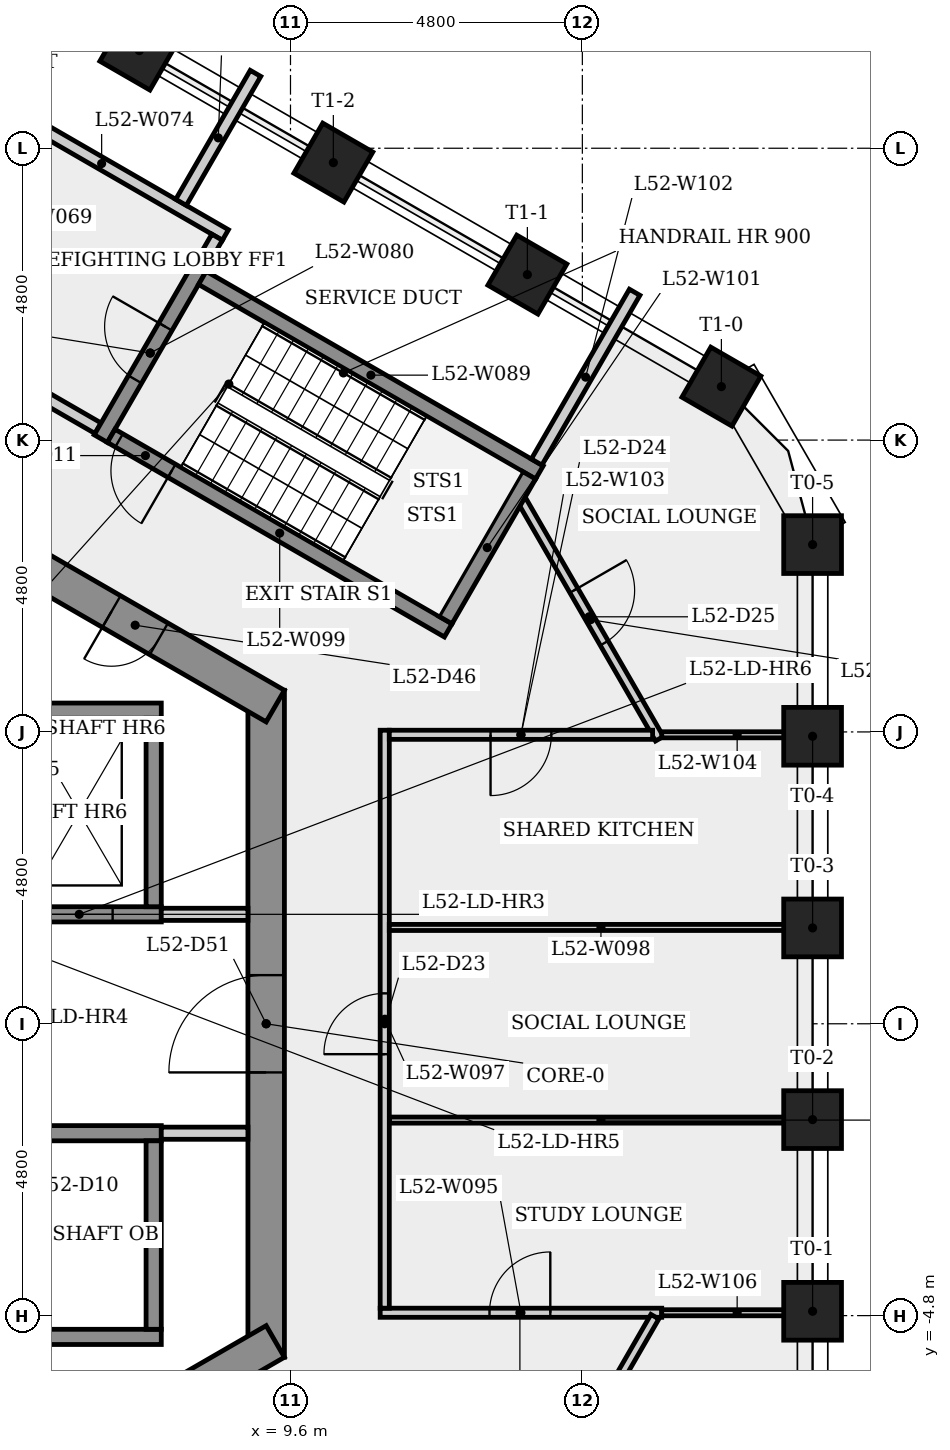
"""IFC4 building model, lengths in metres.
Left out: names, types, materials, properties, quantities, classifications, styles, units other than length and angle.
Written with IfcOpenShell. Run it as: python <this file> out.ifc"""

import sys

from ifc_helpers import new_model, si_unit, direction, frame, frame_2d, origin, origin_2d, place, context, subcontext, project, spatial, rectangle, extrude, element, fill, save


model = new_model("IFC4")
c1 = context("Model", 3, precision=1e-05, world=origin(), true_north=direction((0.0, 1.0)))
c2 = subcontext(c1, "Body", "Model", "MODEL_VIEW")
j1 = project(units=[si_unit("LENGTHUNIT", "METRE"), si_unit("PLANEANGLEUNIT", "RADIAN")], contexts=[c1])
p1 = place(None, origin())
s1 = spatial("IfcSite", under=j1, at=p1, CompositionType="ELEMENT")
p2 = place(p1, origin())
s2 = spatial("IfcBuilding", under=s1, at=p2, CompositionType="ELEMENT")
p3 = place(p2, frame((0.0, 0.0, 194.7)))
s3 = spatial("IfcBuildingStorey", under=s2, at=p3, CompositionType="ELEMENT", Elevation=194.7)
p4 = place(p3, frame((9.2, -5.485, 0.0), z_axis=(0.0, 0.0, 1.0), x_axis=(0.0, 1.0, 0.0)))
e1 = element("IfcWall", 1, at=p4, inside=s3, PredefinedType="SHEAR", context=c2, shape_type="SweptSolid", body=[
    extrude(rectangle(XDim=10.97, YDim=0.6, at=frame_2d((5.485, 0.0))), origin(), (0.0, 0.0, 1.0), 4.0),
])
p5 = place(p4, frame((4.685, 0.0, 0.0)))
e2 = element("IfcOpeningElement", 2, at=p5, cuts=e1, PredefinedType="OPENING", context=c2, shape_type="SweptSolid", body=[
    extrude(rectangle(XDim=1.6, YDim=2.1, at=frame_2d((0.8, 1.05))), frame((0.0, 0.31, 0.0), z_axis=(0.0, -1.0, 0.0), x_axis=(1.0, 0.0, 0.0)), (0.0, 0.0, 1.0), 0.62),
])
p6 = place(p3, frame((9.35, 5.225, 0.0), z_axis=(0.0, 0.0, 1.0), x_axis=(-0.866023993627, 0.500002442456, 0.0)))
e3 = element("IfcWall", 3, at=p6, inside=s3, PredefinedType="SHEAR", context=c2, shape_type="SweptSolid", body=[
    extrude(rectangle(XDim=10.97, YDim=0.6, at=frame_2d((5.485, 0.0))), origin(), (0.0, 0.0, 1.0), 4.0),
])
p7 = place(p6, frame((9.018, 0.0, 0.0)))
e4 = element("IfcOpeningElement", 4, at=p7, cuts=e3, PredefinedType="OPENING", context=c2, shape_type="SweptSolid", body=[
    extrude(rectangle(XDim=0.9, YDim=2.1, at=frame_2d((0.45, 1.05))), frame((0.0, 0.31, 0.0), z_axis=(0.0, -1.0, 0.0), x_axis=(1.0, 0.0, 0.0)), (0.0, 0.0, 1.0), 0.62),
])
p8 = place(p6, frame((2.211, 0.0, 0.0)))
e5 = element("IfcOpeningElement", 5, at=p8, cuts=e3, PredefinedType="OPENING", context=c2, shape_type="SweptSolid", body=[
    extrude(rectangle(XDim=0.9, YDim=2.1, at=frame_2d((0.45, 1.05))), frame((0.0, 0.31, 0.0), z_axis=(0.0, -1.0, 0.0), x_axis=(1.0, 0.0, 0.0)), (0.0, 0.0, 1.0), 0.62),
])
p9 = place(p3, frame((-0.15, -10.71, 0.0), z_axis=(0.0, 0.0, 1.0), x_axis=(0.866023993627, 0.500002442456, 0.0)))
e6 = element("IfcWall", 6, at=p9, inside=s3, PredefinedType="SHEAR", context=c2, shape_type="SweptSolid", body=[
    extrude(rectangle(XDim=10.97, YDim=0.6, at=frame_2d((5.485, 0.0))), origin(), (0.0, 0.0, 1.0), 4.0),
])
p10 = place(p9, frame((7.166, 0.0, 0.0)))
e7 = element("IfcOpeningElement", 7, at=p10, cuts=e6, PredefinedType="OPENING", context=c2, shape_type="SweptSolid", body=[
    extrude(rectangle(XDim=0.9, YDim=2.1, at=frame_2d((0.45, 1.05))), frame((0.0, 0.31, 0.0), z_axis=(0.0, -1.0, 0.0), x_axis=(1.0, 0.0, 0.0)), (0.0, 0.0, 1.0), 0.62),
])
for number, where, z_axis, x_axis in (
    (8, (18.187, -4.729, 0.0), (0.0, 0.0, 1.0), (1.0, 0.0, 0.0)),
    (9, (18.187, -1.576, 0.0), (0.0, 0.0, 1.0), (1.0, 0.0, 0.0)),
    (10, (18.187, 1.576, 0.0), (0.0, 0.0, 1.0), (1.0, 0.0, 0.0)),
    (11, (18.187, 4.729, 0.0), (0.0, 0.0, 1.0), (1.0, 0.0, 0.0)),
    (12, (18.187, 7.881, 0.0), (0.0, 0.0, 1.0), (1.0, 0.0, 0.0)),
    (13, (16.687, 10.479, 0.0), (0.0, 0.0, 1.0), (0.5, 0.866, 0.0)),
    (14, (13.496, 12.322, 0.0), (0.0, 0.0, 1.0), (0.5, 0.866, 0.0)),
    (15, (10.305, 14.164, 0.0), (0.0, 0.0, 1.0), (0.5, 0.866, 0.0)),
    (16, (7.114, 16.006, 0.0), (0.0, 0.0, 1.0), (0.5, 0.866, 0.0)),
):
    element("IfcColumn", number, at=place(p3, frame(where, z_axis=z_axis, x_axis=x_axis)), inside=s3, PredefinedType="COLUMN", context=c2, shape_type="SweptSolid", body=[
        extrude(rectangle(XDim=0.95, YDim=0.95, at=origin_2d()), origin(), (0.0, 0.0, 1.0), 4.0),
    ])
p11 = place(p3, frame((-7.475, 1.8, 0.0), z_axis=(0.0, 0.0, 1.0), x_axis=(1.0, 0.0, 0.0)))
e17 = element("IfcWall", 17, at=p11, inside=s3, PredefinedType="SHEAR", context=c2, shape_type="SweptSolid", body=[
    extrude(rectangle(XDim=14.95, YDim=0.25, at=frame_2d((7.475, 0.0))), origin(), (0.0, 0.0, 1.0), 3.65),
])
p12 = place(p11, frame((0.8, 0.0, 0.0)))
e18 = element("IfcOpeningElement", 18, at=p12, cuts=e17, PredefinedType="OPENING", context=c2, shape_type="SweptSolid", body=[
    extrude(rectangle(XDim=1.1, YDim=2.1, at=frame_2d((0.55, 1.05))), frame((0.0, 0.135, 0.0), z_axis=(0.0, -1.0, 0.0), x_axis=(1.0, 0.0, 0.0)), (0.0, 0.0, 1.0), 0.27),
])
p13 = place(p11, frame((3.25, 0.0, 0.0)))
e19 = element("IfcOpeningElement", 19, at=p13, cuts=e17, PredefinedType="OPENING", context=c2, shape_type="SweptSolid", body=[
    extrude(rectangle(XDim=1.1, YDim=2.1, at=frame_2d((0.55, 1.05))), frame((0.0, 0.135, 0.0), z_axis=(0.0, -1.0, 0.0), x_axis=(1.0, 0.0, 0.0)), (0.0, 0.0, 1.0), 0.27),
])
p14 = place(p11, frame((5.7, 0.0, 0.0)))
e20 = element("IfcOpeningElement", 20, at=p14, cuts=e17, PredefinedType="OPENING", context=c2, shape_type="SweptSolid", body=[
    extrude(rectangle(XDim=1.1, YDim=2.1, at=frame_2d((0.55, 1.05))), frame((0.0, 0.135, 0.0), z_axis=(0.0, -1.0, 0.0), x_axis=(1.0, 0.0, 0.0)), (0.0, 0.0, 1.0), 0.27),
])
p15 = place(p11, frame((8.15, 0.0, 0.0)))
e21 = element("IfcOpeningElement", 21, at=p15, cuts=e17, PredefinedType="OPENING", context=c2, shape_type="SweptSolid", body=[
    extrude(rectangle(XDim=1.1, YDim=2.1, at=frame_2d((0.55, 1.05))), frame((0.0, 0.135, 0.0), z_axis=(0.0, -1.0, 0.0), x_axis=(1.0, 0.0, 0.0)), (0.0, 0.0, 1.0), 0.27),
])
p16 = place(p11, frame((10.6, 0.0, 0.0)))
e22 = element("IfcOpeningElement", 22, at=p16, cuts=e17, PredefinedType="OPENING", context=c2, shape_type="SweptSolid", body=[
    extrude(rectangle(XDim=1.1, YDim=2.1, at=frame_2d((0.55, 1.05))), frame((0.0, 0.135, 0.0), z_axis=(0.0, -1.0, 0.0), x_axis=(1.0, 0.0, 0.0)), (0.0, 0.0, 1.0), 0.27),
])
p17 = place(p11, frame((13.05, 0.0, 0.0)))
e23 = element("IfcOpeningElement", 23, at=p17, cuts=e17, PredefinedType="OPENING", context=c2, shape_type="SweptSolid", body=[
    extrude(rectangle(XDim=1.1, YDim=2.1, at=frame_2d((0.55, 1.05))), frame((0.0, 0.135, 0.0), z_axis=(0.0, -1.0, 0.0), x_axis=(1.0, 0.0, 0.0)), (0.0, 0.0, 1.0), 0.27),
])
p18 = place(p3, frame((-7.225, 5.15, 0.0), z_axis=(0.0, 0.0, 1.0), x_axis=(1.0, 0.0, 0.0)))
e24 = element("IfcWall", 24, at=p18, inside=s3, PredefinedType="SHEAR", context=c2, shape_type="SweptSolid", body=[
    extrude(rectangle(XDim=14.7, YDim=0.25, at=frame_2d((7.35, 0.0))), origin(), (0.0, 0.0, 1.0), 3.65),
])
p19 = place(p3, frame((4.459, 15.323, 0.0), z_axis=(0.0, 0.0, 1.0), x_axis=(0.866016039709, -0.500016218704, 0.0)))
e25 = element("IfcWall", 25, at=p19, inside=s3, PredefinedType="PLUMBINGWALL", context=c2, shape_type="SweptSolid", body=[
    extrude(rectangle(XDim=4.7, YDim=0.2, at=frame_2d((2.35, 0.0))), origin(), (0.0, 0.0, 1.0), 3.65),
])
p20 = place(p3, frame((2.575, -5.15, 0.0), z_axis=(0.0, 0.0, 1.0), x_axis=(1.0, 0.0, 0.0)))
e26 = element("IfcWall", 26, at=p20, inside=s3, PredefinedType="SHEAR", context=c2, shape_type="SweptSolid", body=[
    extrude(rectangle(XDim=4.9, YDim=0.25, at=frame_2d((2.45, 0.0))), origin(), (0.0, 0.0, 1.0), 3.65),
])
p21 = place(p3, frame((2.575, -1.8, 0.0), z_axis=(0.0, 0.0, 1.0), x_axis=(1.0, 0.0, 0.0)))
e27 = element("IfcWall", 27, at=p21, inside=s3, PredefinedType="SHEAR", context=c2, shape_type="SweptSolid", body=[
    extrude(rectangle(XDim=4.9, YDim=0.25, at=frame_2d((2.45, 0.0))), origin(), (0.0, 0.0, 1.0), 3.65),
])
p22 = place(p21, frame((0.597, 0.0, 0.0)))
e28 = element("IfcOpeningElement", 28, at=p22, cuts=e27, PredefinedType="OPENING", context=c2, shape_type="SweptSolid", body=[
    extrude(rectangle(XDim=1.1, YDim=2.1, at=frame_2d((0.55, 1.05))), frame((0.0, 0.135, 0.0), z_axis=(0.0, -1.0, 0.0), x_axis=(1.0, 0.0, 0.0)), (0.0, 0.0, 1.0), 0.27),
])
p23 = place(p3, frame((6.435, 9.795, 0.0), z_axis=(0.0, 0.0, 1.0), x_axis=(-0.866012907634, 0.500021643343, 0.0)))
e29 = element("IfcWall", 29, at=p23, inside=s3, PredefinedType="PARTITIONING", context=c2, shape_type="SweptSolid", body=[
    extrude(rectangle(XDim=4.45, YDim=0.2, at=frame_2d((2.225, 0.0))), origin(), (0.0, 0.0, 1.0), 3.65),
])
p24 = place(p23, frame((1.675, 0.0, 0.0)))
e30 = element("IfcOpeningElement", 30, at=p24, cuts=e29, PredefinedType="OPENING", context=c2, shape_type="SweptSolid", body=[
    extrude(rectangle(XDim=1.1, YDim=2.1, at=frame_2d((0.55, 1.05))), frame((0.0, 0.11, 0.0), z_axis=(0.0, -1.0, 0.0), x_axis=(1.0, 0.0, 0.0)), (0.0, 0.0, 1.0), 0.22),
])
p25 = place(p3, frame((6.48, 9.624, 0.0), z_axis=(0.0, 0.0, 1.0), x_axis=(0.500017246033, 0.866015446554, 0.0)))
e31 = element("IfcWall", 31, at=p25, inside=s3, PredefinedType="SHEAR", context=c2, shape_type="SweptSolid", body=[
    extrude(rectangle(XDim=3.25, YDim=0.25, at=frame_2d((1.625, 0.0))), origin(), (0.0, 0.0, 1.0), 3.65),
])
p26 = place(p25, frame((1.125, 0.0, 0.0)))
e32 = element("IfcOpeningElement", 32, at=p26, cuts=e31, PredefinedType="OPENING", context=c2, shape_type="SweptSolid", body=[
    extrude(rectangle(XDim=1.0, YDim=2.1, at=frame_2d((0.5, 1.05))), frame((0.0, 0.135, 0.0), z_axis=(0.0, -1.0, 0.0), x_axis=(1.0, 0.0, 0.0)), (0.0, 0.0, 1.0), 0.27),
])
p27 = place(p3, frame((7.475, 1.8, 0.0), z_axis=(0.0, 0.0, 1.0), x_axis=(1.0, 0.0, 0.0)))
e33 = element("IfcWall", 33, at=p27, inside=s3, PredefinedType="PARTITIONING", context=c2, shape_type="SweptSolid", body=[
    extrude(rectangle(XDim=1.425, YDim=0.2, at=frame_2d((0.712, 0.0))), origin(), (0.0, 0.0, 1.0), 3.65),
])
for number, where, z_axis, x_axis in (
    (34, (7.35, -1.925, 0.0), (0.0, 0.0, 1.0), (0.0, -1.0, 0.0)),
    (35, (7.35, 5.025, 0.0), (0.0, 0.0, 1.0), (0.0, -1.0, 0.0)),
):
    element("IfcWall", number, at=place(p3, frame(where, z_axis=z_axis, x_axis=x_axis)), inside=s3, PredefinedType="SHEAR", context=c2, shape_type="SweptSolid", body=[
        extrude(rectangle(XDim=3.1, YDim=0.25, at=frame_2d((1.55, 0.0))), origin(), (0.0, 0.0, 1.0), 4.0),
    ])
p28 = place(p3, frame((7.8, 13.51, 0.0), z_axis=(0.0, 0.0, 1.0), x_axis=(0.499955409341, 0.866051146683, 0.0)))
e36 = element("IfcWall", 36, at=p28, inside=s3, PredefinedType="PLUMBINGWALL", context=c2, shape_type="SweptSolid", body=[
    extrude(rectangle(XDim=2.449, YDim=0.2, at=frame_2d((1.225, 0.0))), origin(), (0.0, 0.0, 1.0), 3.65),
])
p29 = place(p3, frame((8.151, 12.268, 0.0), z_axis=(0.0, 0.0, 1.0), x_axis=(0.866025499775, -0.499999833739, 0.0)))
e37 = element("IfcWall", 37, at=p29, inside=s3, PredefinedType="SHEAR", context=c2, shape_type="SweptSolid", body=[
    extrude(rectangle(XDim=6.4, YDim=0.25, at=frame_2d((3.2, 0.0))), origin(), (0.0, 0.0, 1.0), 3.65),
])
p30 = place(p3, frame((8.393, 12.937, 0.0), z_axis=(0.0, 0.0, 1.0), x_axis=(-0.500065409566, -0.86598763626, 0.0)))
e38 = element("IfcWall", 38, at=p30, inside=s3, PredefinedType="PLUMBINGWALL", context=c2, shape_type="SweptSolid", body=[
    extrude(rectangle(XDim=0.575, YDim=0.2, at=frame_2d((0.288, 0.0))), origin(), (0.0, 0.0, 1.0), 3.65),
])
p31 = place(p3, frame((8.9, -1.8, 0.0), z_axis=(0.0, 0.0, 1.0), x_axis=(-1.0, 0.0, 0.0)))
e39 = element("IfcWall", 39, at=p31, inside=s3, PredefinedType="PARTITIONING", context=c2, shape_type="SweptSolid", body=[
    extrude(rectangle(XDim=1.425, YDim=0.2, at=frame_2d((0.712, 0.0))), origin(), (0.0, 0.0, 1.0), 3.65),
])
p32 = place(p3, frame((11.075, -4.753, 0.0), z_axis=(0.0, 0.0, 1.0), x_axis=(1.0, 0.0, 0.0)))
e40 = element("IfcWall", 40, at=p32, inside=s3, PredefinedType="PARTITIONING", context=c2, shape_type="SweptSolid", body=[
    extrude(rectangle(XDim=4.63, YDim=0.15, at=frame_2d((2.315, 0.0))), origin(), (0.0, 0.0, 1.0), 3.65),
])
p33 = place(p32, frame((1.798, 0.0, 0.0)))
e41 = element("IfcOpeningElement", 41, at=p33, cuts=e40, PredefinedType="OPENING", context=c2, shape_type="SweptSolid", body=[
    extrude(rectangle(XDim=1.0, YDim=2.1, at=frame_2d((0.5, 1.05))), frame((0.0, 0.085, 0.0), z_axis=(0.0, -1.0, 0.0), x_axis=(1.0, 0.0, 0.0)), (0.0, 0.0, 1.0), 0.17),
])
p34 = place(p3, frame((11.225, -1.584, 0.0), z_axis=(0.0, 0.0, 1.0), x_axis=(1.0, 0.0, 0.0)))
e42 = element("IfcWall", 42, at=p34, inside=s3, PredefinedType="PARTITIONING", context=c2, shape_type="SweptSolid", body=[
    extrude(rectangle(XDim=6.961, YDim=0.1, at=frame_2d((3.481, 0.0))), origin(), (0.0, 0.0, 1.0), 3.65),
])
p35 = place(p3, frame((11.15, -4.678, 0.0), z_axis=(0.0, 0.0, 1.0), x_axis=(0.0, 1.0, 0.0)))
e43 = element("IfcWall", 43, at=p35, inside=s3, PredefinedType="PARTITIONING", context=c2, shape_type="SweptSolid", body=[
    extrude(rectangle(XDim=9.506, YDim=0.15, at=frame_2d((4.753, 0.0))), origin(), (0.0, 0.0, 1.0), 3.65),
])
p36 = place(p35, frame((4.178, 0.0, 0.0)))
e44 = element("IfcOpeningElement", 44, at=p36, cuts=e43, PredefinedType="OPENING", context=c2, shape_type="SweptSolid", body=[
    extrude(rectangle(XDim=1.0, YDim=2.1, at=frame_2d((0.5, 1.05))), frame((0.0, 0.085, 0.0), z_axis=(0.0, -1.0, 0.0), x_axis=(1.0, 0.0, 0.0)), (0.0, 0.0, 1.0), 0.17),
])
p37 = place(p3, frame((11.225, 1.584, 0.0), z_axis=(0.0, 0.0, 1.0), x_axis=(1.0, 0.0, 0.0)))
e45 = element("IfcWall", 45, at=p37, inside=s3, PredefinedType="PARTITIONING", context=c2, shape_type="SweptSolid", body=[
    extrude(rectangle(XDim=6.961, YDim=0.1, at=frame_2d((3.481, 0.0))), origin(), (0.0, 0.0, 1.0), 3.65),
])
p38 = place(p3, frame((12.194, 6.47, 0.0), z_axis=(0.0, 0.0, 1.0), x_axis=(-0.866025499775, 0.499999833739, 0.0)))
e46 = element("IfcWall", 46, at=p38, inside=s3, PredefinedType="SHEAR", context=c2, shape_type="SweptSolid", body=[
    extrude(rectangle(XDim=6.4, YDim=0.25, at=frame_2d((3.2, 0.0))), origin(), (0.0, 0.0, 1.0), 3.65),
])
p39 = place(p38, frame((5.25, 0.0, 0.0)))
e47 = element("IfcOpeningElement", 47, at=p39, cuts=e46, PredefinedType="OPENING", context=c2, shape_type="SweptSolid", body=[
    extrude(rectangle(XDim=1.0, YDim=2.1, at=frame_2d((0.5, 1.05))), frame((0.0, 0.135, 0.0), z_axis=(0.0, -1.0, 0.0), x_axis=(1.0, 0.0, 0.0)), (0.0, 0.0, 1.0), 0.27),
])
p40 = place(p3, frame((13.406, 8.604, 0.0), z_axis=(0.0, 0.0, 1.0), x_axis=(0.500005951055, -0.866021967914, 0.0)))
e48 = element("IfcWall", 48, at=p40, inside=s3, PredefinedType="PARTITIONING", context=c2, shape_type="SweptSolid", body=[
    extrude(rectangle(XDim=4.522, YDim=0.15, at=frame_2d((2.261, 0.0))), origin(), (0.0, 0.0, 1.0), 3.65),
])
p41 = place(p40, frame((1.706, 0.0, 0.0)))
e49 = element("IfcOpeningElement", 49, at=p41, cuts=e48, PredefinedType="OPENING", context=c2, shape_type="SweptSolid", body=[
    extrude(rectangle(XDim=1.0, YDim=2.1, at=frame_2d((0.5, 1.05))), frame((0.0, 0.085, 0.0), z_axis=(0.0, -1.0, 0.0), x_axis=(1.0, 0.0, 0.0)), (0.0, 0.0, 1.0), 0.17),
])
p42 = place(p3, frame((12.148, 6.641, 0.0), z_axis=(0.0, 0.0, 1.0), x_axis=(0.500034990121, 0.866005201286, 0.0)))
e50 = element("IfcWall", 50, at=p42, inside=s3, PredefinedType="SHEAR", context=c2, shape_type="SweptSolid", body=[
    extrude(rectangle(XDim=2.75, YDim=0.25, at=frame_2d((1.375, 0.0))), origin(), (0.0, 0.0, 1.0), 3.65),
])
p43 = place(p3, frame((15.26, 12.031, 0.0), z_axis=(0.0, 0.0, 1.0), x_axis=(-0.499958409347, -0.866049414828, 0.0)))
e51 = element("IfcWall", 51, at=p43, inside=s3, PredefinedType="PLUMBINGWALL", context=c2, shape_type="SweptSolid", body=[
    extrude(rectangle(XDim=3.224, YDim=0.2, at=frame_2d((1.612, 0.0))), origin(), (0.0, 0.0, 1.0), 3.65),
])
p44 = place(p3, frame((15.555, 4.753, 0.0), z_axis=(0.0, 0.0, 1.0), x_axis=(-1.0, 0.0, 0.0)))
e52 = element("IfcWall", 52, at=p44, inside=s3, PredefinedType="PARTITIONING", context=c2, shape_type="SweptSolid", body=[
    extrude(rectangle(XDim=4.33, YDim=0.15, at=frame_2d((2.165, 0.0))), origin(), (0.0, 0.0, 1.0), 3.65),
])
p45 = place(p44, frame((1.665, 0.0, 0.0)))
e53 = element("IfcOpeningElement", 53, at=p45, cuts=e52, PredefinedType="OPENING", context=c2, shape_type="SweptSolid", body=[
    extrude(rectangle(XDim=1.0, YDim=2.1, at=frame_2d((0.5, 1.05))), frame((0.0, 0.085, 0.0), z_axis=(0.0, -1.0, 0.0), x_axis=(1.0, 0.0, 0.0)), (0.0, 0.0, 1.0), 0.17),
])
p46 = place(p3, frame((15.705, 4.753, 0.0), z_axis=(0.0, 0.0, 1.0), x_axis=(1.0, 0.0, 0.0)))
e54 = element("IfcWall", 54, at=p46, inside=s3, PredefinedType="PARTITIONING", context=c2, shape_type="SweptSolid", body=[
    extrude(rectangle(XDim=2.481, YDim=0.1, at=frame_2d((1.241, 0.0))), origin(), (0.0, 0.0, 1.0), 3.65),
])
p47 = place(p3, frame((15.593, -4.818, 0.0), z_axis=(0.0, 0.0, 1.0), x_axis=(-0.500000242082, -0.866025264018, 0.0)))
e55 = element("IfcWall", 55, at=p47, inside=s3, PredefinedType="PARTITIONING", context=c2, shape_type="SweptSolid", body=[
    extrude(rectangle(XDim=7.861, YDim=0.15, at=frame_2d((3.931, 0.0))), origin(), (0.0, 0.0, 1.0), 3.65),
])
p48 = place(p47, frame((3.431, 0.0, 0.0)))
e56 = element("IfcOpeningElement", 56, at=p48, cuts=e55, PredefinedType="OPENING", context=c2, shape_type="SweptSolid", body=[
    extrude(rectangle(XDim=1.0, YDim=2.1, at=frame_2d((0.5, 1.05))), frame((0.0, 0.085, 0.0), z_axis=(0.0, -1.0, 0.0), x_axis=(1.0, 0.0, 0.0)), (0.0, 0.0, 1.0), 0.17),
])
p49 = place(p3, frame((18.187, -4.753, 0.0), z_axis=(0.0, 0.0, 1.0), x_axis=(-1.0, 0.0, 0.0)))
e57 = element("IfcWall", 57, at=p49, inside=s3, PredefinedType="PARTITIONING", context=c2, shape_type="SweptSolid", body=[
    extrude(rectangle(XDim=2.481, YDim=0.1, at=frame_2d((1.241, 0.0))), origin(), (0.0, 0.0, 1.0), 3.65),
])
p50 = place(p17, origin())
e58 = element("IfcDoor", 58, at=p50, inside=s3, OperationType="SLIDING_TO_LEFT", PredefinedType="DOOR", context=c2, shape_type="SweptSolid", body=[
    extrude(rectangle(XDim=1.1, YDim=2.1, at=frame_2d((0.55, 1.05))), frame((0.0, 0.025, 0.0), z_axis=(0.0, -1.0, 0.0), x_axis=(1.0, 0.0, 0.0)), (0.0, 0.0, 1.0), 0.05),
])
fill(e23, e58)
p51 = place(p39, origin())
e59 = element("IfcDoor", 59, at=p51, inside=s3, OperationType="SINGLE_SWING_LEFT", PredefinedType="DOOR", context=c2, shape_type="SweptSolid", body=[
    extrude(rectangle(XDim=1.0, YDim=2.1, at=frame_2d((0.5, 1.05))), frame((0.0, 0.025, 0.0), z_axis=(0.0, -1.0, 0.0), x_axis=(1.0, 0.0, 0.0)), (0.0, 0.0, 1.0), 0.05),
])
fill(e47, e59)
p52 = place(p26, origin())
e60 = element("IfcDoor", 60, at=p52, inside=s3, OperationType="SINGLE_SWING_RIGHT", PredefinedType="DOOR", context=c2, shape_type="SweptSolid", body=[
    extrude(rectangle(XDim=1.0, YDim=2.1, at=frame_2d((0.5, 1.05))), frame((0.0, 0.025, 0.0), z_axis=(0.0, -1.0, 0.0), x_axis=(1.0, 0.0, 0.0)), (0.0, 0.0, 1.0), 0.05),
])
fill(e32, e60)
p53 = place(p33, origin())
e61 = element("IfcDoor", 61, at=p53, inside=s3, OperationType="SINGLE_SWING_RIGHT", PredefinedType="DOOR", context=c2, shape_type="SweptSolid", body=[
    extrude(rectangle(XDim=1.0, YDim=2.1, at=frame_2d((0.5, 1.05))), frame((0.0, 0.025, 0.0), z_axis=(0.0, -1.0, 0.0), x_axis=(1.0, 0.0, 0.0)), (0.0, 0.0, 1.0), 0.05),
])
fill(e41, e61)
p54 = place(p36, origin())
e62 = element("IfcDoor", 62, at=p54, inside=s3, OperationType="SINGLE_SWING_LEFT", PredefinedType="DOOR", context=c2, shape_type="SweptSolid", body=[
    extrude(rectangle(XDim=1.0, YDim=2.1, at=frame_2d((0.5, 1.05))), frame((0.0, 0.025, 0.0), z_axis=(0.0, -1.0, 0.0), x_axis=(1.0, 0.0, 0.0)), (0.0, 0.0, 1.0), 0.05),
])
fill(e44, e62)
p55 = place(p45, origin())
e63 = element("IfcDoor", 63, at=p55, inside=s3, OperationType="SINGLE_SWING_RIGHT", PredefinedType="DOOR", context=c2, shape_type="SweptSolid", body=[
    extrude(rectangle(XDim=1.0, YDim=2.1, at=frame_2d((0.5, 1.05))), frame((0.0, 0.025, 0.0), z_axis=(0.0, -1.0, 0.0), x_axis=(1.0, 0.0, 0.0)), (0.0, 0.0, 1.0), 0.05),
])
fill(e53, e63)
p56 = place(p41, origin())
e64 = element("IfcDoor", 64, at=p56, inside=s3, OperationType="SINGLE_SWING_LEFT", PredefinedType="DOOR", context=c2, shape_type="SweptSolid", body=[
    extrude(rectangle(XDim=1.0, YDim=2.1, at=frame_2d((0.5, 1.05))), frame((0.0, 0.025, 0.0), z_axis=(0.0, -1.0, 0.0), x_axis=(1.0, 0.0, 0.0)), (0.0, 0.0, 1.0), 0.05),
])
fill(e49, e64)
p57 = place(p8, origin())
e65 = element("IfcDoor", 65, at=p57, inside=s3, OperationType="SINGLE_SWING_RIGHT", PredefinedType="DOOR", context=c2, shape_type="SweptSolid", body=[
    extrude(rectangle(XDim=0.9, YDim=2.1, at=frame_2d((0.45, 1.05))), frame((0.0, 0.025, 0.0), z_axis=(0.0, -1.0, 0.0), x_axis=(1.0, 0.0, 0.0)), (0.0, 0.0, 1.0), 0.05),
])
fill(e5, e65)
p58 = place(p5, origin())
e66 = element("IfcDoor", 66, at=p58, inside=s3, OperationType="SINGLE_SWING_LEFT", PredefinedType="DOOR", context=c2, shape_type="SweptSolid", body=[
    extrude(rectangle(XDim=1.6, YDim=2.1, at=frame_2d((0.8, 1.05))), frame((0.0, 0.025, 0.0), z_axis=(0.0, -1.0, 0.0), x_axis=(1.0, 0.0, 0.0)), (0.0, 0.0, 1.0), 0.05),
])
fill(e2, e66)
save(model, sys.argv[1])
